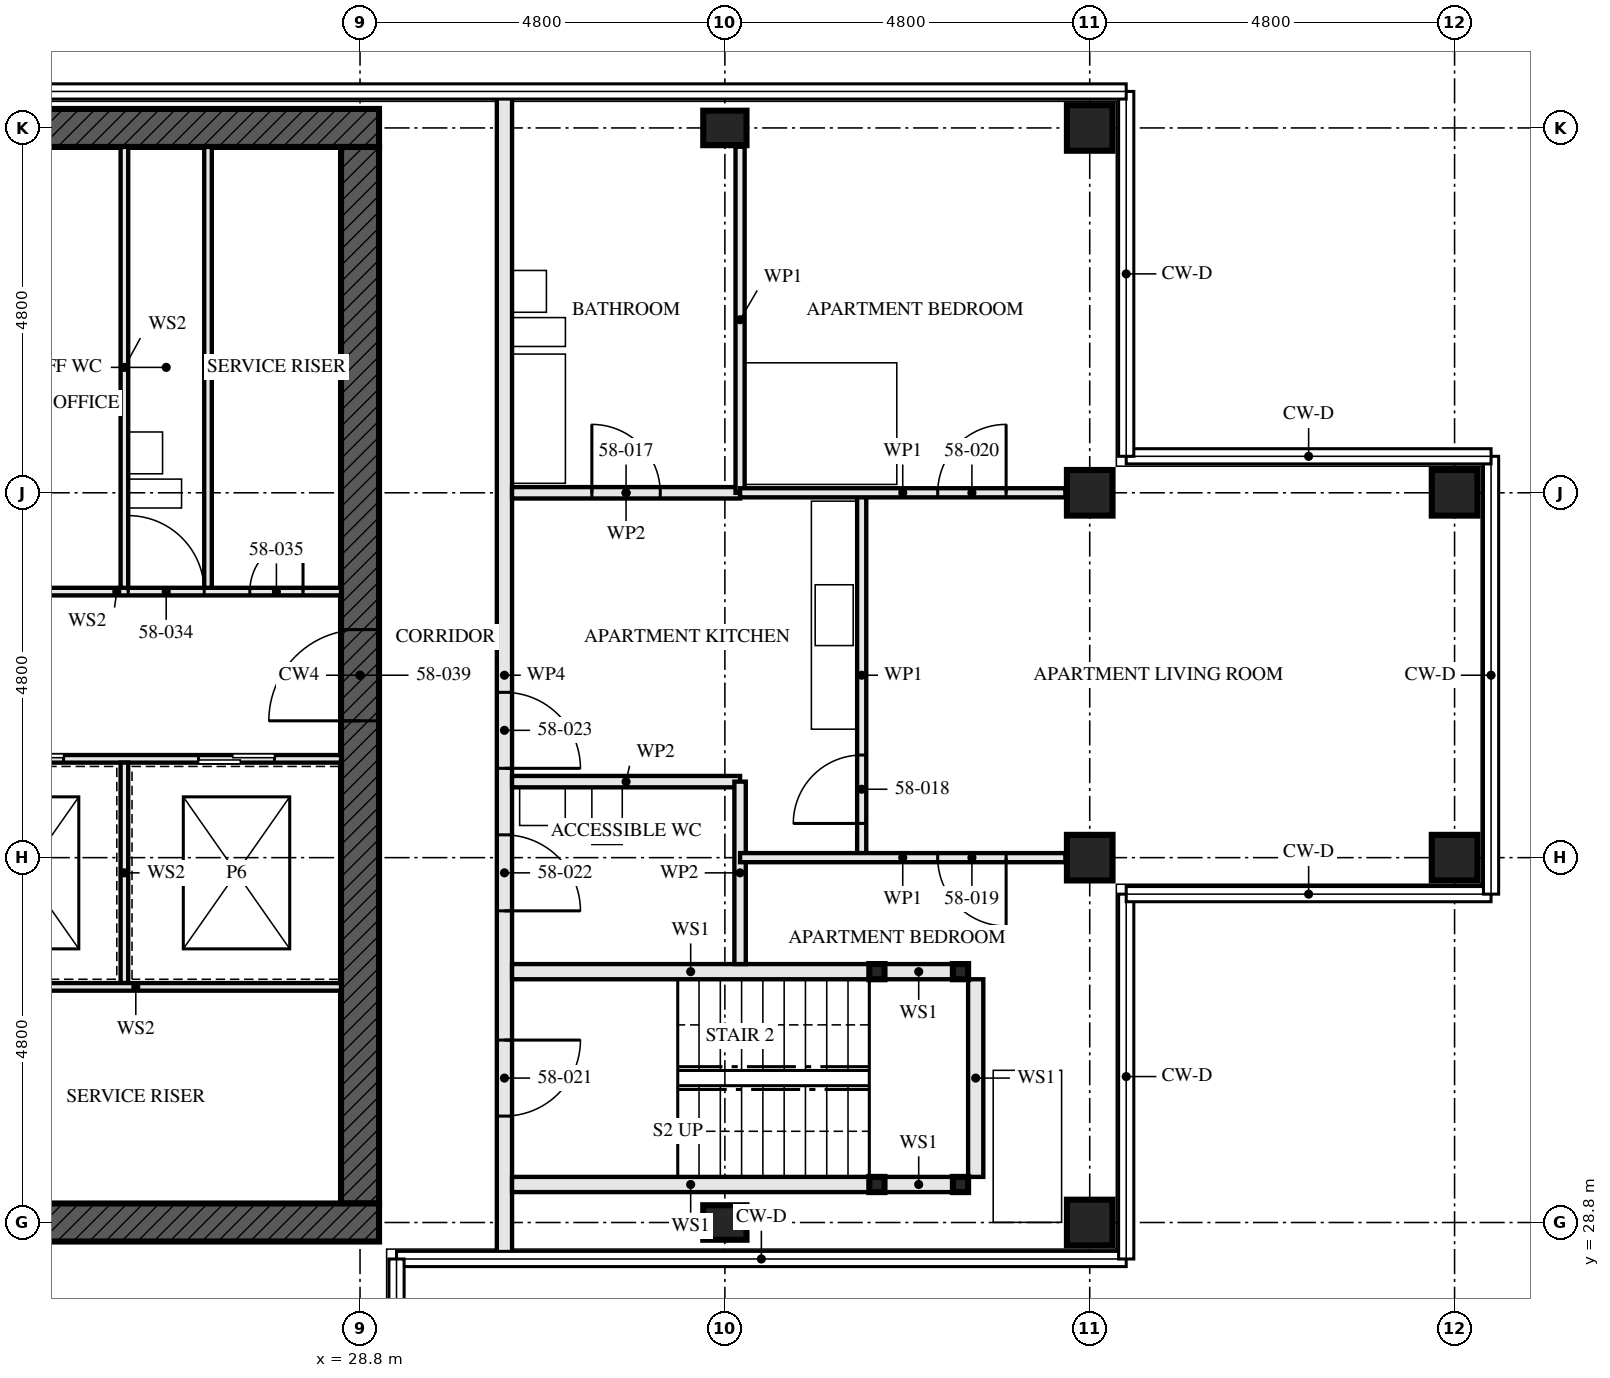
"""IFC4 building model, lengths in metres.
Left out: names, types, materials, properties, quantities, classifications, styles, units other than length and angle.
Written with IfcOpenShell. Run it as: python <this file> out.ifc"""

import sys

from ifc_helpers import new_model, si_unit, direction, frame, frame_2d, origin, origin_2d, place, context, subcontext, project, spatial, rectangle, hollow_rectangle, i_section, extrude, element, fill, save


model = new_model("IFC4")
c1 = context("Model", 3, precision=1e-05, world=origin(), true_north=direction((0.0, 1.0)))
c2 = subcontext(c1, "Body", "Model", "MODEL_VIEW")
j1 = project(units=[si_unit("LENGTHUNIT", "METRE"), si_unit("PLANEANGLEUNIT", "RADIAN")], contexts=[c1])
p1 = place(None, origin())
s1 = spatial("IfcSite", under=j1, at=p1, CompositionType="ELEMENT")
p2 = place(p1, origin())
s2 = spatial("IfcBuilding", under=s1, at=p2, CompositionType="ELEMENT")
p3 = place(p2, frame((0.0, 0.0, 212.0)))
s3 = spatial("IfcBuildingStorey", under=s2, at=p3, CompositionType="ELEMENT", Elevation=212.0)
for number, where, z_axis, x_axis in (
    (1, (33.6, 28.8, 0.0), (0.0, 0.0, 1.0), (0.0, 1.0, 0.0)),
    (2, (33.6, 43.2, 0.0), (0.0, 0.0, 1.0), (0.0, 1.0, 0.0)),
):
    element("IfcColumn", number, at=place(p3, frame(where, z_axis=z_axis, x_axis=x_axis)), inside=s3, PredefinedType="COLUMN", context=c2, shape_type="SweptSolid", body=[
        extrude(i_section(OverallWidth=0.454, OverallDepth=0.569, WebThickness=0.078, FlangeThickness=0.125, FilletRadius=0.015, at=origin_2d()), origin(), (0.0, 0.0, 1.0), 3.5),
    ])
for number, where, z_axis, x_axis in (
    (3, (38.4, 28.8, 0.0), (0.0, 0.0, 1.0), (0.0, 1.0, 0.0)),
    (4, (38.4, 33.6, 0.0), (0.0, 0.0, 1.0), (0.0, 1.0, 0.0)),
    (5, (38.4, 38.4, 0.0), (0.0, 0.0, 1.0), (0.0, 1.0, 0.0)),
    (6, (38.4, 43.2, 0.0), (0.0, 0.0, 1.0), (0.0, 1.0, 0.0)),
    (7, (43.2, 33.6, 0.0), (0.0, 0.0, 1.0), (0.0, 1.0, 0.0)),
    (8, (43.2, 38.4, 0.0), (0.0, 0.0, 1.0), (0.0, 1.0, 0.0)),
):
    element("IfcColumn", number, at=place(p3, frame(where, z_axis=z_axis, x_axis=x_axis)), inside=s3, PredefinedType="COLUMN", context=c2, shape_type="SweptSolid", body=[
        extrude(hollow_rectangle(XDim=0.6, YDim=0.6, WallThickness=0.05, at=origin_2d()), origin(), (0.0, 0.0, 1.0), 3.5),
    ])
p4 = place(p3, frame((14.15, 28.8, -0.17), z_axis=(0.0, 0.0, 1.0), x_axis=(1.0, 0.0, 0.0)))
e9 = element("IfcWall", 9, at=p4, inside=s3, PredefinedType="SHEAR", context=c2, shape_type="SweptSolid", body=[
    extrude(rectangle(XDim=14.9, YDim=0.5, at=frame_2d((7.45, 0.0))), origin(), (0.0, 0.0, 1.0), 3.5),
])
p5 = place(p4, frame((6.85, 0.0, 0.17)))
e10 = element("IfcOpeningElement", 10, at=p5, cuts=e9, PredefinedType="OPENING", context=c2, shape_type="SweptSolid", body=[
    extrude(rectangle(XDim=1.2, YDim=2.1, at=frame_2d((0.6, 1.05))), frame((0.0, 0.26, 0.0), z_axis=(0.0, -1.0, 0.0), x_axis=(1.0, 0.0, 0.0)), (0.0, 0.0, 1.0), 0.521),
])
p6 = place(p3, frame((29.05, 43.2, -0.17), z_axis=(0.0, 0.0, 1.0), x_axis=(-1.0, 0.0, 0.0)))
e11 = element("IfcWall", 11, at=p6, inside=s3, PredefinedType="SHEAR", context=c2, shape_type="SweptSolid", body=[
    extrude(rectangle(XDim=14.9, YDim=0.5, at=frame_2d((7.45, 0.0))), origin(), (0.0, 0.0, 1.0), 3.5),
])
p7 = place(p3, frame((28.8, 29.05, -0.17), z_axis=(0.0, 0.0, 1.0), x_axis=(0.0, 1.0, 0.0)))
e12 = element("IfcWall", 12, at=p7, inside=s3, PredefinedType="SHEAR", context=c2, shape_type="SweptSolid", body=[
    extrude(rectangle(XDim=13.9, YDim=0.5, at=frame_2d((6.95, 0.0))), origin(), (0.0, 0.0, 1.0), 3.5),
])
p8 = place(p7, frame((6.35, 0.0, 0.17)))
e13 = element("IfcOpeningElement", 13, at=p8, cuts=e12, PredefinedType="OPENING", context=c2, shape_type="SweptSolid", body=[
    extrude(rectangle(XDim=1.2, YDim=2.1, at=frame_2d((0.6, 1.05))), frame((0.0, 0.26, 0.0), z_axis=(0.0, -1.0, 0.0), x_axis=(1.0, 0.0, 0.0)), (0.0, 0.0, 1.0), 0.521),
])
for number, where, z_axis, x_axis in (
    (14, (36.7, 29.3, 0.0), (0.0, 0.0, 1.0), (1.0, 0.0, 0.0)),
    (15, (36.7, 32.1, 0.0), (0.0, 0.0, 1.0), (1.0, 0.0, 0.0)),
    (16, (35.6, 29.3, 0.0), (0.0, 0.0, 1.0), (1.0, 0.0, 0.0)),
    (17, (35.6, 32.1, 0.0), (0.0, 0.0, 1.0), (1.0, 0.0, 0.0)),
):
    element("IfcColumn", number, at=place(p3, frame(where, z_axis=z_axis, x_axis=x_axis)), inside=s3, PredefinedType="COLUMN", context=c2, shape_type="SweptSolid", body=[
        extrude(hollow_rectangle(XDim=0.2, YDim=0.2, WallThickness=0.008, at=origin_2d()), origin(), (0.0, 0.0, 1.0), 3.33),
    ])
p9 = place(p3, frame((36.6, 29.3, 0.0), z_axis=(0.0, 0.0, 1.0), x_axis=(-1.0, 0.0, 0.0)))
e18 = element("IfcWall", 18, at=p9, inside=s3, PredefinedType="SOLIDWALL", context=c2, shape_type="SweptSolid", body=[
    extrude(rectangle(XDim=0.9, YDim=0.2, at=frame_2d((0.45, 0.0))), origin(), (0.0, 0.0, 1.0), 2.99),
])
p10 = place(p3, frame((35.5, 29.3, 0.0), z_axis=(0.0, 0.0, 1.0), x_axis=(-1.0, 0.0, 0.0)))
e19 = element("IfcWall", 19, at=p10, inside=s3, PredefinedType="SOLIDWALL", context=c2, shape_type="SweptSolid", body=[
    extrude(rectangle(XDim=4.7, YDim=0.2, at=frame_2d((2.35, 0.0))), origin(), (0.0, 0.0, 1.0), 2.99),
])
p11 = place(p3, frame((36.6, 32.1, 0.0), z_axis=(0.0, 0.0, 1.0), x_axis=(-1.0, 0.0, 0.0)))
e20 = element("IfcWall", 20, at=p11, inside=s3, PredefinedType="SOLIDWALL", context=c2, shape_type="SweptSolid", body=[
    extrude(rectangle(XDim=0.9, YDim=0.2, at=frame_2d((0.45, 0.0))), origin(), (0.0, 0.0, 1.0), 2.99),
])
p12 = place(p3, frame((35.5, 32.1, 0.0), z_axis=(0.0, 0.0, 1.0), x_axis=(-1.0, 0.0, 0.0)))
e21 = element("IfcWall", 21, at=p12, inside=s3, PredefinedType="SOLIDWALL", context=c2, shape_type="SweptSolid", body=[
    extrude(rectangle(XDim=4.7, YDim=0.2, at=frame_2d((2.35, 0.0))), origin(), (0.0, 0.0, 1.0), 2.99),
])
p13 = place(p3, frame((36.9, 29.4, 0.0), z_axis=(0.0, 0.0, 1.0), x_axis=(0.0, 1.0, 0.0)))
e22 = element("IfcWall", 22, at=p13, inside=s3, PredefinedType="SOLIDWALL", context=c2, shape_type="SweptSolid", body=[
    extrude(rectangle(XDim=2.6, YDim=0.2, at=frame_2d((1.3, 0.0))), origin(), (0.0, 0.0, 1.0), 3.33),
])
p14 = place(p3, frame((33.8, 32.2, 0.0), z_axis=(0.0, 0.0, 1.0), x_axis=(0.0, 1.0, 0.0)))
e23 = element("IfcWall", 23, at=p14, inside=s3, PredefinedType="PARTITIONING", context=c2, shape_type="SweptSolid", body=[
    extrude(rectangle(XDim=2.4, YDim=0.15, at=frame_2d((1.2, 0.0))), origin(), (0.0, 0.0, 1.0), 2.55),
])
p15 = place(p3, frame((33.8, 34.6, 0.0), z_axis=(0.0, 0.0, 1.0), x_axis=(-1.0, 0.0, 0.0)))
e24 = element("IfcWall", 24, at=p15, inside=s3, PredefinedType="PARTITIONING", context=c2, shape_type="SweptSolid", body=[
    extrude(rectangle(XDim=3.0, YDim=0.15, at=frame_2d((1.5, 0.0))), origin(), (0.0, 0.0, 1.0), 3.33),
])
p16 = place(p3, frame((33.8, 38.4, 0.0), z_axis=(0.0, 0.0, 1.0), x_axis=(-1.0, 0.0, 0.0)))
e25 = element("IfcWall", 25, at=p16, inside=s3, PredefinedType="PARTITIONING", context=c2, shape_type="SweptSolid", body=[
    extrude(rectangle(XDim=3.0, YDim=0.15, at=frame_2d((1.5, 0.0))), origin(), (0.0, 0.0, 1.0), 2.55),
])
p17 = place(p16, frame((1.05, 0.0, 0.0)))
e26 = element("IfcOpeningElement", 26, at=p17, cuts=e25, PredefinedType="OPENING", context=c2, shape_type="SweptSolid", body=[
    extrude(rectangle(XDim=0.9, YDim=2.1, at=frame_2d((0.45, 1.05))), frame((0.0, 0.085, 0.0), z_axis=(0.0, -1.0, 0.0), x_axis=(1.0, 0.0, 0.0)), (0.0, 0.0, 1.0), 0.171),
])
p18 = place(p3, frame((35.4, 33.6, 0.0), z_axis=(0.0, 0.0, 1.0), x_axis=(0.0, 1.0, 0.0)))
e27 = element("IfcWall", 27, at=p18, inside=s3, PredefinedType="PARTITIONING", context=c2, shape_type="SweptSolid", body=[
    extrude(rectangle(XDim=4.8, YDim=0.12, at=frame_2d((2.4, 0.0))), origin(), (0.0, 0.0, 1.0), 3.33),
])
p19 = place(p18, frame((0.45, 0.0, 0.0)))
e28 = element("IfcOpeningElement", 28, at=p19, cuts=e27, PredefinedType="OPENING", context=c2, shape_type="SweptSolid", body=[
    extrude(rectangle(XDim=0.9, YDim=2.1, at=frame_2d((0.45, 1.05))), frame((0.0, 0.071, 0.0), z_axis=(0.0, -1.0, 0.0), x_axis=(1.0, 0.0, 0.0)), (0.0, 0.0, 1.0), 0.141),
])
p20 = place(p3, frame((33.8, 38.4, 0.0), z_axis=(0.0, 0.0, 1.0), x_axis=(0.0, 1.0, 0.0)))
e29 = element("IfcWall", 29, at=p20, inside=s3, PredefinedType="PARTITIONING", context=c2, shape_type="SweptSolid", body=[
    extrude(rectangle(XDim=4.553, YDim=0.12, at=frame_2d((2.276, 0.0))), origin(), (0.0, 0.0, 1.0), 3.33),
])
p21 = place(p3, frame((38.08, 33.6, 0.0), z_axis=(0.0, 0.0, 1.0), x_axis=(-1.0, 0.0, 0.0)))
e30 = element("IfcWall", 30, at=p21, inside=s3, PredefinedType="PARTITIONING", context=c2, shape_type="SweptSolid", body=[
    extrude(rectangle(XDim=4.28, YDim=0.12, at=frame_2d((2.14, 0.0))), origin(), (0.0, 0.0, 1.0), 2.55),
])
p22 = place(p21, frame((0.78, 0.0, 0.0)))
e31 = element("IfcOpeningElement", 31, at=p22, cuts=e30, PredefinedType="OPENING", context=c2, shape_type="SweptSolid", body=[
    extrude(rectangle(XDim=0.9, YDim=2.1, at=frame_2d((0.45, 1.05))), frame((0.0, 0.071, 0.0), z_axis=(0.0, -1.0, 0.0), x_axis=(1.0, 0.0, 0.0)), (0.0, 0.0, 1.0), 0.141),
])
p23 = place(p3, frame((38.08, 38.4, 0.0), z_axis=(0.0, 0.0, 1.0), x_axis=(-1.0, 0.0, 0.0)))
e32 = element("IfcWall", 32, at=p23, inside=s3, PredefinedType="PARTITIONING", context=c2, shape_type="SweptSolid", body=[
    extrude(rectangle(XDim=4.28, YDim=0.12, at=frame_2d((2.14, 0.0))), origin(), (0.0, 0.0, 1.0), 2.55),
])
p24 = place(p23, frame((0.78, 0.0, 0.0)))
e33 = element("IfcOpeningElement", 33, at=p24, cuts=e32, PredefinedType="OPENING", context=c2, shape_type="SweptSolid", body=[
    extrude(rectangle(XDim=0.9, YDim=2.1, at=frame_2d((0.45, 1.05))), frame((0.0, 0.071, 0.0), z_axis=(0.0, -1.0, 0.0), x_axis=(1.0, 0.0, 0.0)), (0.0, 0.0, 1.0), 0.141),
])
p25 = place(p3, frame((30.7, 28.345, 0.0), z_axis=(0.0, 0.0, 1.0), x_axis=(0.0, 1.0, 0.0)))
e34 = element("IfcWall", 34, at=p25, inside=s3, PredefinedType="PARTITIONING", context=c2, shape_type="SweptSolid", body=[
    extrude(rectangle(XDim=15.31, YDim=0.2, at=frame_2d((7.655, 0.0))), origin(), (0.0, 0.0, 1.0), 2.32),
])
p26 = place(p25, frame((1.855, 0.0, 0.0)))
e35 = element("IfcOpeningElement", 35, at=p26, cuts=e34, PredefinedType="OPENING", context=c2, shape_type="SweptSolid", body=[
    extrude(rectangle(XDim=1.0, YDim=2.1, at=frame_2d((0.5, 1.05))), frame((0.0, 0.111, 0.0), z_axis=(0.0, -1.0, 0.0), x_axis=(1.0, 0.0, 0.0)), (0.0, 0.0, 1.0), 0.221),
])
p27 = place(p25, frame((4.555, 0.0, 0.0)))
e36 = element("IfcOpeningElement", 36, at=p27, cuts=e34, PredefinedType="OPENING", context=c2, shape_type="SweptSolid", body=[
    extrude(rectangle(XDim=1.0, YDim=2.1, at=frame_2d((0.5, 1.05))), frame((0.0, 0.111, 0.0), z_axis=(0.0, -1.0, 0.0), x_axis=(1.0, 0.0, 0.0)), (0.0, 0.0, 1.0), 0.221),
])
p28 = place(p25, frame((6.43, 0.0, 0.0)))
e37 = element("IfcOpeningElement", 37, at=p28, cuts=e34, PredefinedType="OPENING", context=c2, shape_type="SweptSolid", body=[
    extrude(rectangle(XDim=1.0, YDim=2.1, at=frame_2d((0.5, 1.05))), frame((0.0, 0.111, 0.0), z_axis=(0.0, -1.0, 0.0), x_axis=(1.0, 0.0, 0.0)), (0.0, 0.0, 1.0), 0.221),
])
p29 = place(p3, frame((26.8, 37.15, 0.0), z_axis=(0.0, 0.0, 1.0), x_axis=(0.0, 1.0, 0.0)))
e38 = element("IfcWall", 38, at=p29, inside=s3, PredefinedType="SOLIDWALL", context=c2, shape_type="SweptSolid", body=[
    extrude(rectangle(XDim=5.8, YDim=0.1, at=frame_2d((2.9, 0.0))), origin(), (0.0, 0.0, 1.0), 3.33),
])
p30 = place(p3, frame((23.05, 34.9, 0.0), z_axis=(0.0, 0.0, 1.0), x_axis=(1.0, 0.0, 0.0)))
e39 = element("IfcWall", 39, at=p30, inside=s3, PredefinedType="SOLIDWALL", context=c2, shape_type="SweptSolid", body=[
    extrude(rectangle(XDim=5.5, YDim=0.1, at=frame_2d((2.75, 0.0))), origin(), (0.0, 0.0, 1.0), 3.33),
])
p31 = place(p30, frame((0.85, 0.0, 0.0)))
e40 = element("IfcOpeningElement", 40, at=p31, cuts=e39, PredefinedType="OPENING", context=c2, shape_type="SweptSolid", body=[
    extrude(rectangle(XDim=1.0, YDim=2.1, at=frame_2d((0.5, 1.05))), frame((0.0, 0.061, 0.0), z_axis=(0.0, -1.0, 0.0), x_axis=(1.0, 0.0, 0.0)), (0.0, 0.0, 1.0), 0.121),
])
p32 = place(p30, frame((3.625, 0.0, 0.0)))
e41 = element("IfcOpeningElement", 41, at=p32, cuts=e39, PredefinedType="OPENING", context=c2, shape_type="SweptSolid", body=[
    extrude(rectangle(XDim=1.0, YDim=2.1, at=frame_2d((0.5, 1.05))), frame((0.0, 0.061, 0.0), z_axis=(0.0, -1.0, 0.0), x_axis=(1.0, 0.0, 0.0)), (0.0, 0.0, 1.0), 0.121),
])
p33 = place(p3, frame((22.65, 37.1, 0.0), z_axis=(0.0, 0.0, 1.0), x_axis=(1.0, 0.0, 0.0)))
e42 = element("IfcWall", 42, at=p33, inside=s3, PredefinedType="SOLIDWALL", context=c2, shape_type="SweptSolid", body=[
    extrude(rectangle(XDim=5.9, YDim=0.1, at=frame_2d((2.95, 0.0))), origin(), (0.0, 0.0, 1.0), 3.33),
])
p34 = place(p33, frame((3.1, 0.0, 0.0)))
e43 = element("IfcOpeningElement", 43, at=p34, cuts=e42, PredefinedType="OPENING", context=c2, shape_type="SweptSolid", body=[
    extrude(rectangle(XDim=1.0, YDim=2.1, at=frame_2d((0.5, 1.05))), frame((0.0, 0.061, 0.0), z_axis=(0.0, -1.0, 0.0), x_axis=(1.0, 0.0, 0.0)), (0.0, 0.0, 1.0), 0.121),
])
p35 = place(p33, frame((4.7, 0.0, 0.0)))
e44 = element("IfcOpeningElement", 44, at=p35, cuts=e42, PredefinedType="OPENING", context=c2, shape_type="SweptSolid", body=[
    extrude(rectangle(XDim=0.7, YDim=2.1, at=frame_2d((0.35, 1.05))), frame((0.0, 0.061, 0.0), z_axis=(0.0, -1.0, 0.0), x_axis=(1.0, 0.0, 0.0)), (0.0, 0.0, 1.0), 0.121),
])
p36 = place(p3, frame((25.7, 37.15, 0.0), z_axis=(0.0, 0.0, 1.0), x_axis=(0.0, 1.0, 0.0)))
e45 = element("IfcWall", 45, at=p36, inside=s3, PredefinedType="SOLIDWALL", context=c2, shape_type="SweptSolid", body=[
    extrude(rectangle(XDim=5.8, YDim=0.1, at=frame_2d((2.9, 0.0))), origin(), (0.0, 0.0, 1.0), 3.33),
])
p37 = place(p3, frame((25.7, 31.95, 0.0), z_axis=(0.0, 0.0, 1.0), x_axis=(0.0, 1.0, 0.0)))
e46 = element("IfcWall", 46, at=p37, inside=s3, PredefinedType="SOLIDWALL", context=c2, shape_type="SweptSolid", body=[
    extrude(rectangle(XDim=2.9, YDim=0.1, at=frame_2d((1.45, 0.0))), origin(), (0.0, 0.0, 1.0), 3.33),
])
p38 = place(p3, frame((23.15, 31.9, 0.0), z_axis=(0.0, 0.0, 1.0), x_axis=(1.0, 0.0, 0.0)))
e47 = element("IfcWall", 47, at=p38, inside=s3, PredefinedType="SOLIDWALL", context=c2, shape_type="SweptSolid", body=[
    extrude(rectangle(XDim=5.4, YDim=0.1, at=frame_2d((2.7, 0.0))), origin(), (0.0, 0.0, 1.0), 3.33),
])
p39 = place(p17, frame((0.9, 0.0, 0.0), z_axis=(0.0, 0.0, 1.0), x_axis=(-1.0, 0.0, 0.0)))
e48 = element("IfcDoor", 48, at=p39, inside=s3, OperationType="SINGLE_SWING_RIGHT", PredefinedType="DOOR", context=c2, shape_type="SweptSolid", body=[
    extrude(rectangle(XDim=0.9, YDim=2.1, at=frame_2d((0.45, 1.05))), frame((0.0, 0.022, 0.0), z_axis=(0.0, -1.0, 0.0), x_axis=(1.0, 0.0, 0.0)), (0.0, 0.0, 1.0), 0.044),
])
fill(e26, e48)
p40 = place(p19, origin())
e49 = element("IfcDoor", 49, at=p40, inside=s3, OperationType="SINGLE_SWING_RIGHT", PredefinedType="DOOR", context=c2, shape_type="SweptSolid", body=[
    extrude(rectangle(XDim=0.9, YDim=2.1, at=frame_2d((0.45, 1.05))), frame((0.0, 0.022, 0.0), z_axis=(0.0, -1.0, 0.0), x_axis=(1.0, 0.0, 0.0)), (0.0, 0.0, 1.0), 0.044),
])
fill(e28, e49)
p41 = place(p22, origin())
e50 = element("IfcDoor", 50, at=p41, inside=s3, OperationType="SINGLE_SWING_RIGHT", PredefinedType="DOOR", context=c2, shape_type="SweptSolid", body=[
    extrude(rectangle(XDim=0.9, YDim=2.1, at=frame_2d((0.45, 1.05))), frame((0.0, 0.022, 0.0), z_axis=(0.0, -1.0, 0.0), x_axis=(1.0, 0.0, 0.0)), (0.0, 0.0, 1.0), 0.044),
])
fill(e31, e50)
p42 = place(p24, frame((0.9, 0.0, 0.0), z_axis=(0.0, 0.0, 1.0), x_axis=(-1.0, 0.0, 0.0)))
e51 = element("IfcDoor", 51, at=p42, inside=s3, OperationType="SINGLE_SWING_LEFT", PredefinedType="DOOR", context=c2, shape_type="SweptSolid", body=[
    extrude(rectangle(XDim=0.9, YDim=2.1, at=frame_2d((0.45, 1.05))), frame((0.0, 0.022, 0.0), z_axis=(0.0, -1.0, 0.0), x_axis=(1.0, 0.0, 0.0)), (0.0, 0.0, 1.0), 0.044),
])
fill(e33, e51)
p43 = place(p26, frame((1.0, 0.0, 0.0), z_axis=(0.0, 0.0, 1.0), x_axis=(-1.0, 0.0, 0.0)))
e52 = element("IfcDoor", 52, at=p43, inside=s3, OperationType="SINGLE_SWING_RIGHT", PredefinedType="DOOR", context=c2, shape_type="SweptSolid", body=[
    extrude(rectangle(XDim=1.0, YDim=2.1, at=frame_2d((0.5, 1.05))), frame((0.0, 0.032, 0.0), z_axis=(0.0, -1.0, 0.0), x_axis=(1.0, 0.0, 0.0)), (0.0, 0.0, 1.0), 0.064),
])
fill(e35, e52)
p44 = place(p27, frame((1.0, 0.0, 0.0), z_axis=(0.0, 0.0, 1.0), x_axis=(-1.0, 0.0, 0.0)))
e53 = element("IfcDoor", 53, at=p44, inside=s3, OperationType="SINGLE_SWING_LEFT", PredefinedType="DOOR", context=c2, shape_type="SweptSolid", body=[
    extrude(rectangle(XDim=1.0, YDim=2.1, at=frame_2d((0.5, 1.05))), frame((0.0, 0.027, 0.0), z_axis=(0.0, -1.0, 0.0), x_axis=(1.0, 0.0, 0.0)), (0.0, 0.0, 1.0), 0.054),
])
fill(e36, e53)
p45 = place(p28, frame((1.0, 0.0, 0.0), z_axis=(0.0, 0.0, 1.0), x_axis=(-1.0, 0.0, 0.0)))
e54 = element("IfcDoor", 54, at=p45, inside=s3, OperationType="SINGLE_SWING_LEFT", PredefinedType="DOOR", context=c2, shape_type="SweptSolid", body=[
    extrude(rectangle(XDim=1.0, YDim=2.1, at=frame_2d((0.5, 1.05))), frame((0.0, 0.027, 0.0), z_axis=(0.0, -1.0, 0.0), x_axis=(1.0, 0.0, 0.0)), (0.0, 0.0, 1.0), 0.054),
])
fill(e37, e54)
p46 = place(p31, origin())
e55 = element("IfcDoor", 55, at=p46, inside=s3, OperationType="SLIDING_TO_LEFT", PredefinedType="DOOR", context=c2, shape_type="SweptSolid", body=[
    extrude(rectangle(XDim=1.0, YDim=2.1, at=frame_2d((0.5, 1.05))), frame((0.0, 0.05, 0.0), z_axis=(0.0, -1.0, 0.0), x_axis=(1.0, 0.0, 0.0)), (0.0, 0.0, 1.0), 0.1),
])
fill(e40, e55)
p47 = place(p32, origin())
e56 = element("IfcDoor", 56, at=p47, inside=s3, OperationType="SLIDING_TO_LEFT", PredefinedType="DOOR", context=c2, shape_type="SweptSolid", body=[
    extrude(rectangle(XDim=1.0, YDim=2.1, at=frame_2d((0.5, 1.05))), frame((0.0, 0.05, 0.0), z_axis=(0.0, -1.0, 0.0), x_axis=(1.0, 0.0, 0.0)), (0.0, 0.0, 1.0), 0.1),
])
fill(e41, e56)
p48 = place(p34, origin())
e57 = element("IfcDoor", 57, at=p48, inside=s3, OperationType="SINGLE_SWING_RIGHT", PredefinedType="DOOR", context=c2, shape_type="SweptSolid", body=[
    extrude(rectangle(XDim=1.0, YDim=2.1, at=frame_2d((0.5, 1.05))), frame((0.0, 0.027, 0.0), z_axis=(0.0, -1.0, 0.0), x_axis=(1.0, 0.0, 0.0)), (0.0, 0.0, 1.0), 0.054),
])
fill(e43, e57)
p49 = place(p35, origin())
e58 = element("IfcDoor", 58, at=p49, inside=s3, OperationType="SINGLE_SWING_LEFT", PredefinedType="DOOR", context=c2, shape_type="SweptSolid", body=[
    extrude(rectangle(XDim=0.7, YDim=2.1, at=frame_2d((0.35, 1.05))), frame((0.0, 0.027, 0.0), z_axis=(0.0, -1.0, 0.0), x_axis=(1.0, 0.0, 0.0)), (0.0, 0.0, 1.0), 0.054),
])
fill(e44, e58)
p50 = place(p8, origin())
e59 = element("IfcDoor", 59, at=p50, inside=s3, OperationType="SINGLE_SWING_LEFT", PredefinedType="DOOR", context=c2, shape_type="SweptSolid", body=[
    extrude(rectangle(XDim=1.2, YDim=2.1, at=frame_2d((0.6, 1.05))), frame((0.0, 0.027, 0.0), z_axis=(0.0, -1.0, 0.0), x_axis=(1.0, 0.0, 0.0)), (0.0, 0.0, 1.0), 0.054),
])
fill(e13, e59)
save(model, sys.argv[1])
